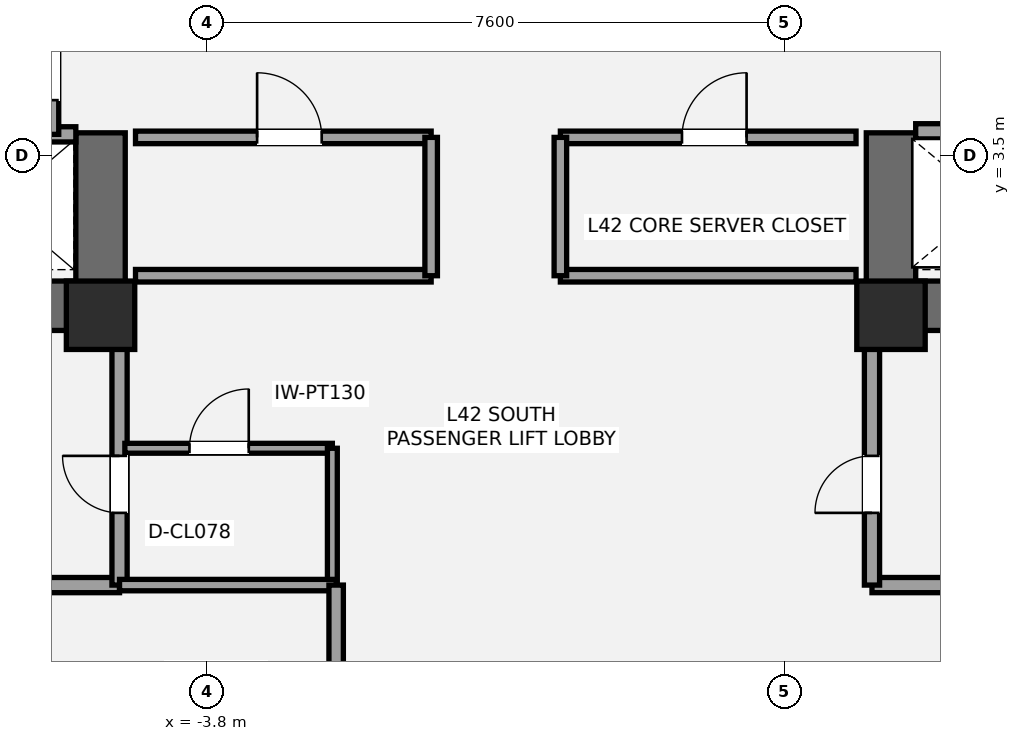
"""IFC4 building model, lengths in metres.
Left out: names, types, materials, properties, quantities, classifications, styles, units other than length and angle.
Written with IfcOpenShell. Run it as: python <this file> out.ifc"""

import sys

from ifc_helpers import new_model, si_unit, direction, frame, frame_2d, origin, origin_2d, place, context, subcontext, project, spatial, rectangle, extrude, element, fill, save


model = new_model("IFC4")
c1 = context("Model", 3, precision=1e-05, world=origin(), true_north=direction((0.0, 1.0)))
c2 = subcontext(c1, "Body", "Model", "MODEL_VIEW")
j1 = project(units=[si_unit("LENGTHUNIT", "METRE"), si_unit("PLANEANGLEUNIT", "RADIAN")], contexts=[c1])
p1 = place(None, origin())
s1 = spatial("IfcSite", under=j1, at=p1, CompositionType="ELEMENT")
p2 = place(p1, origin())
s2 = spatial("IfcBuilding", under=s1, at=p2, CompositionType="ELEMENT")
p3 = place(p2, frame((0.0, 0.0, 156.6)))
s3 = spatial("IfcBuildingStorey", under=s2, at=p3, CompositionType="ELEMENT", Elevation=156.6)
p4 = place(p3, frame((-4.875, 1.525, 0.0), z_axis=(0.0, 0.0, 1.0), x_axis=(-1.0, 0.0, 0.0)))
e1 = element("IfcWall", 1, at=p4, inside=s3, PredefinedType="SHEAR", context=c2, shape_type="SweptSolid", body=[
    extrude(rectangle(XDim=8.925, YDim=0.65, at=frame_2d((4.462, 0.0))), origin(), (0.0, 0.0, 1.0), 3.2),
])
p5 = place(p4, frame((5.425, 0.0, 0.0)))
e2 = element("IfcOpeningElement", 2, at=p5, cuts=e1, PredefinedType="OPENING", context=c2, shape_type="SweptSolid", body=[
    extrude(rectangle(XDim=1.05, YDim=2.15, at=frame_2d((0.525, 1.075))), frame((0.0, 0.335, 0.0), z_axis=(0.0, -1.0, 0.0), x_axis=(1.0, 0.0, 0.0)), (0.0, 0.0, 1.0), 0.67),
])
p6 = place(p4, frame((3.755, 0.0, 0.0)))
e3 = element("IfcOpeningElement", 3, at=p6, cuts=e1, PredefinedType="OPENING", context=c2, shape_type="SweptSolid", body=[
    extrude(rectangle(XDim=1.1, YDim=2.2, at=frame_2d((0.55, 1.1))), frame((0.0, 0.335, 0.0), z_axis=(0.0, -1.0, 0.0), x_axis=(1.0, 0.0, 0.0)), (0.0, 0.0, 1.0), 0.67),
])
p7 = place(p3, frame((-5.2, 1.2, 0.0), z_axis=(0.0, 0.0, 1.0), x_axis=(0.0, 1.0, 0.0)))
e4 = element("IfcWall", 4, at=p7, inside=s3, PredefinedType="SHEAR", context=c2, shape_type="SweptSolid", body=[
    extrude(rectangle(XDim=2.6, YDim=0.65, at=frame_2d((1.3, 0.0))), origin(), (0.0, 0.0, 1.0), 3.2),
])
p8 = place(p3, frame((13.8, 1.525, 0.0), z_axis=(0.0, 0.0, 1.0), x_axis=(-1.0, 0.0, 0.0)))
e5 = element("IfcWall", 5, at=p8, inside=s3, PredefinedType="SHEAR", context=c2, shape_type="SweptSolid", body=[
    extrude(rectangle(XDim=8.925, YDim=0.65, at=frame_2d((4.462, 0.0))), origin(), (0.0, 0.0, 1.0), 3.2),
])
p9 = place(p8, frame((2.45, 0.0, 0.0)))
e6 = element("IfcOpeningElement", 6, at=p9, cuts=e5, PredefinedType="OPENING", context=c2, shape_type="SweptSolid", body=[
    extrude(rectangle(XDim=1.05, YDim=2.15, at=frame_2d((0.525, 1.075))), frame((0.0, 0.335, 0.0), z_axis=(0.0, -1.0, 0.0), x_axis=(1.0, 0.0, 0.0)), (0.0, 0.0, 1.0), 0.67),
])
p10 = place(p8, frame((4.45, 0.0, 0.0)))
e7 = element("IfcOpeningElement", 7, at=p10, cuts=e5, PredefinedType="OPENING", context=c2, shape_type="SweptSolid", body=[
    extrude(rectangle(XDim=1.1, YDim=2.2, at=frame_2d((0.55, 1.1))), frame((0.0, 0.335, 0.0), z_axis=(0.0, -1.0, 0.0), x_axis=(1.0, 0.0, 0.0)), (0.0, 0.0, 1.0), 0.67),
])
p11 = place(p3, frame((5.2, 1.2, 0.0), z_axis=(0.0, 0.0, 1.0), x_axis=(0.0, 1.0, 0.0)))
e8 = element("IfcWall", 8, at=p11, inside=s3, PredefinedType="SHEAR", context=c2, shape_type="SweptSolid", body=[
    extrude(rectangle(XDim=2.6, YDim=0.65, at=frame_2d((1.3, 0.0))), origin(), (0.0, 0.0, 1.0), 3.2),
])
for number, where, z_axis, x_axis in (
    (9, (-5.2, 1.4, 0.0), (0.0, 0.0, 1.0), (1.0, 0.0, 0.0)),
    (10, (5.2, 1.4, 0.0), (0.0, 0.0, 1.0), (1.0, 0.0, 0.0)),
):
    element("IfcColumn", number, at=place(p3, frame(where, z_axis=z_axis, x_axis=x_axis)), inside=s3, PredefinedType="COLUMN", context=c2, shape_type="SweptSolid", body=[
        extrude(rectangle(XDim=0.9, YDim=0.9, at=origin_2d()), origin(), (0.0, 0.0, 1.0), 3.2),
    ])
p12 = place(p3, frame((-7.2, -2.15, 0.0), z_axis=(0.0, 0.0, 1.0), x_axis=(1.0, 0.0, 0.0)))
e11 = element("IfcWall", 11, at=p12, inside=s3, PredefinedType="SOLIDWALL", context=c2, shape_type="SweptSolid", body=[
    extrude(rectangle(XDim=2.25, YDim=0.2, at=frame_2d((1.125, 0.0))), origin(), (0.0, 0.0, 1.0), 3.02),
])
p13 = place(p3, frame((-4.95, -2.15, 0.0), z_axis=(0.0, 0.0, 1.0), x_axis=(0.0, 1.0, 0.0)))
e12 = element("IfcWall", 12, at=p13, inside=s3, PredefinedType="SOLIDWALL", context=c2, shape_type="SweptSolid", body=[
    extrude(rectangle(XDim=3.4, YDim=0.2, at=frame_2d((1.7, 0.0))), origin(), (0.0, 0.0, 1.0), 2.473),
])
p14 = place(p13, frame((0.95, 0.0, 0.0)))
e13 = element("IfcOpeningElement", 13, at=p14, cuts=e12, PredefinedType="OPENING", context=c2, shape_type="SweptSolid", body=[
    extrude(rectangle(XDim=0.75, YDim=2.1, at=frame_2d((0.375, 1.05))), frame((0.0, 0.11, 0.0), z_axis=(0.0, -1.0, 0.0), x_axis=(1.0, 0.0, 0.0)), (0.0, 0.0, 1.0), 0.22),
])
p15 = place(p3, frame((4.95, -2.15, 0.0), z_axis=(0.0, 0.0, 1.0), x_axis=(1.0, 0.0, 0.0)))
e14 = element("IfcWall", 14, at=p15, inside=s3, PredefinedType="SOLIDWALL", context=c2, shape_type="SweptSolid", body=[
    extrude(rectangle(XDim=2.25, YDim=0.2, at=frame_2d((1.125, 0.0))), origin(), (0.0, 0.0, 1.0), 3.02),
])
p16 = place(p3, frame((4.95, -2.15, 0.0), z_axis=(0.0, 0.0, 1.0), x_axis=(0.0, 1.0, 0.0)))
e15 = element("IfcWall", 15, at=p16, inside=s3, PredefinedType="SOLIDWALL", context=c2, shape_type="SweptSolid", body=[
    extrude(rectangle(XDim=3.4, YDim=0.2, at=frame_2d((1.7, 0.0))), origin(), (0.0, 0.0, 1.0), 2.473),
])
p17 = place(p16, frame((0.95, 0.0, 0.0)))
e16 = element("IfcOpeningElement", 16, at=p17, cuts=e15, PredefinedType="OPENING", context=c2, shape_type="SweptSolid", body=[
    extrude(rectangle(XDim=0.75, YDim=2.1, at=frame_2d((0.375, 1.05))), frame((0.0, 0.11, 0.0), z_axis=(0.0, -1.0, 0.0), x_axis=(1.0, 0.0, 0.0)), (0.0, 0.0, 1.0), 0.22),
])
p18 = place(p3, frame((-4.88, -0.35, 0.0), z_axis=(0.0, 0.0, 1.0), x_axis=(1.0, 0.0, 0.0)))
e17 = element("IfcWall", 17, at=p18, inside=s3, PredefinedType="PARTITIONING", context=c2, shape_type="SweptSolid", body=[
    extrude(rectangle(XDim=2.73, YDim=0.13, at=frame_2d((1.365, 0.0))), origin(), (0.0, 0.0, 1.0), 2.473),
])
p19 = place(p18, frame((0.85, 0.0, 0.0)))
e18 = element("IfcOpeningElement", 18, at=p19, cuts=e17, PredefinedType="OPENING", context=c2, shape_type="SweptSolid", body=[
    extrude(rectangle(XDim=0.78, YDim=2.1, at=frame_2d((0.39, 1.05))), frame((0.0, 0.075, 0.0), z_axis=(0.0, -1.0, 0.0), x_axis=(1.0, 0.0, 0.0)), (0.0, 0.0, 1.0), 0.15),
])
p20 = place(p3, frame((-2.15, -2.15, 0.0), z_axis=(0.0, 0.0, 1.0), x_axis=(0.0, 1.0, 0.0)))
e19 = element("IfcWall", 19, at=p20, inside=s3, PredefinedType="PARTITIONING", context=c2, shape_type="SweptSolid", body=[
    extrude(rectangle(XDim=1.8, YDim=0.13, at=frame_2d((0.9, 0.0))), origin(), (0.0, 0.0, 1.0), 3.02),
])
p21 = place(p3, frame((-9.78, 3.78, 0.0), z_axis=(0.0, 0.0, 1.0), x_axis=(1.0, 0.0, 0.0)))
e20 = element("IfcWall", 20, at=p21, inside=s3, PredefinedType="SOLIDWALL", context=c2, shape_type="SweptSolid", body=[
    extrude(rectangle(XDim=4.255, YDim=0.2, at=frame_2d((2.127, 0.0))), origin(), (0.0, 0.0, 1.0), 3.02),
])
p22 = place(p3, frame((-5.85, 3.78, 0.0), z_axis=(0.0, 0.0, 1.0), x_axis=(0.0, 1.0, 0.0)))
e21 = element("IfcWall", 21, at=p22, inside=s3, PredefinedType="SOLIDWALL", context=c2, shape_type="SweptSolid", body=[
    extrude(rectangle(XDim=1.69, YDim=0.2, at=frame_2d((0.845, 0.0))), origin(), (0.0, 0.0, 1.0), 3.02),
])
p23 = place(p22, frame((0.45, 0.0, 0.0)))
e22 = element("IfcOpeningElement", 22, at=p23, cuts=e21, PredefinedType="OPENING", context=c2, shape_type="SweptSolid", body=[
    extrude(rectangle(XDim=0.75, YDim=2.1, at=frame_2d((0.375, 1.05))), frame((0.0, 0.11, 0.0), z_axis=(0.0, -1.0, 0.0), x_axis=(1.0, 0.0, 0.0)), (0.0, 0.0, 1.0), 0.22),
])
p24 = place(p3, frame((5.525, 3.82, 0.0), z_axis=(0.0, 0.0, 1.0), x_axis=(1.0, 0.0, 0.0)))
e23 = element("IfcWall", 23, at=p24, inside=s3, PredefinedType="SOLIDWALL", context=c2, shape_type="SweptSolid", body=[
    extrude(rectangle(XDim=4.255, YDim=0.2, at=frame_2d((2.127, 0.0))), origin(), (0.0, 0.0, 1.0), 3.02),
])
p25 = place(p24, frame((0.65, 0.0, 0.0)))
e24 = element("IfcOpeningElement", 24, at=p25, cuts=e23, PredefinedType="OPENING", context=c2, shape_type="SweptSolid", body=[
    extrude(rectangle(XDim=1.2, YDim=2.2, at=frame_2d((0.6, 1.1))), frame((0.0, 0.11, 0.0), z_axis=(0.0, -1.0, 0.0), x_axis=(1.0, 0.0, 0.0)), (0.0, 0.0, 1.0), 0.22),
])
p26 = place(p3, frame((-4.74, 1.92, 0.0), z_axis=(0.0, 0.0, 1.0), x_axis=(1.0, 0.0, 0.0)))
e25 = element("IfcWall", 25, at=p26, inside=s3, PredefinedType="PARTITIONING", context=c2, shape_type="SweptSolid", body=[
    extrude(rectangle(XDim=3.89, YDim=0.165, at=frame_2d((1.945, 0.0))), origin(), (0.0, 0.0, 1.0), 2.16),
])
p27 = place(p3, frame((-4.74, 3.74, 0.0), z_axis=(0.0, 0.0, 1.0), x_axis=(1.0, 0.0, 0.0)))
e26 = element("IfcWall", 26, at=p27, inside=s3, PredefinedType="PARTITIONING", context=c2, shape_type="SweptSolid", body=[
    extrude(rectangle(XDim=3.89, YDim=0.165, at=frame_2d((1.945, 0.0))), origin(), (0.0, 0.0, 1.0), 3.02),
])
p28 = place(p27, frame((1.6, 0.0, 0.0)))
e27 = element("IfcOpeningElement", 27, at=p28, cuts=e26, PredefinedType="OPENING", context=c2, shape_type="SweptSolid", body=[
    extrude(rectangle(XDim=0.85, YDim=2.1, at=frame_2d((0.425, 1.05))), frame((0.0, 0.093, 0.0), z_axis=(0.0, -1.0, 0.0), x_axis=(1.0, 0.0, 0.0)), (0.0, 0.0, 1.0), 0.185),
])
p29 = place(p3, frame((-0.85, 1.92, 0.0), z_axis=(0.0, 0.0, 1.0), x_axis=(0.0, 1.0, 0.0)))
e28 = element("IfcWall", 28, at=p29, inside=s3, PredefinedType="PARTITIONING", context=c2, shape_type="SweptSolid", body=[
    extrude(rectangle(XDim=1.82, YDim=0.165, at=frame_2d((0.91, 0.0))), origin(), (0.0, 0.0, 1.0), 3.02),
])
p30 = place(p3, frame((0.85, 1.92, 0.0), z_axis=(0.0, 0.0, 1.0), x_axis=(1.0, 0.0, 0.0)))
e29 = element("IfcWall", 29, at=p30, inside=s3, PredefinedType="PARTITIONING", context=c2, shape_type="SweptSolid", body=[
    extrude(rectangle(XDim=3.89, YDim=0.165, at=frame_2d((1.945, 0.0))), origin(), (0.0, 0.0, 1.0), 2.16),
])
p31 = place(p3, frame((0.85, 3.74, 0.0), z_axis=(0.0, 0.0, 1.0), x_axis=(1.0, 0.0, 0.0)))
e30 = element("IfcWall", 30, at=p31, inside=s3, PredefinedType="PARTITIONING", context=c2, shape_type="SweptSolid", body=[
    extrude(rectangle(XDim=3.89, YDim=0.165, at=frame_2d((1.945, 0.0))), origin(), (0.0, 0.0, 1.0), 3.02),
])
p32 = place(p31, frame((1.6, 0.0, 0.0)))
e31 = element("IfcOpeningElement", 31, at=p32, cuts=e30, PredefinedType="OPENING", context=c2, shape_type="SweptSolid", body=[
    extrude(rectangle(XDim=0.85, YDim=2.1, at=frame_2d((0.425, 1.05))), frame((0.0, 0.093, 0.0), z_axis=(0.0, -1.0, 0.0), x_axis=(1.0, 0.0, 0.0)), (0.0, 0.0, 1.0), 0.185),
])
p33 = place(p3, frame((0.85, 1.92, 0.0), z_axis=(0.0, 0.0, 1.0), x_axis=(0.0, 1.0, 0.0)))
e32 = element("IfcWall", 32, at=p33, inside=s3, PredefinedType="PARTITIONING", context=c2, shape_type="SweptSolid", body=[
    extrude(rectangle(XDim=1.82, YDim=0.165, at=frame_2d((0.91, 0.0))), origin(), (0.0, 0.0, 1.0), 3.02),
])
p34 = place(p3, frame((-4.95, -2.15, 0.0), z_axis=(0.0, 0.0, 1.0), x_axis=(1.0, 0.0, 0.0)))
e33 = element("IfcWall", 33, at=p34, inside=s3, PredefinedType="PLUMBINGWALL", context=c2, shape_type="SweptSolid", body=[
    extrude(rectangle(XDim=2.85, YDim=0.15, at=frame_2d((1.425, 0.0))), origin(), (0.0, 0.0, 1.0), 2.473),
])
p35 = place(p3, frame((-2.1, -4.05, 0.0), z_axis=(0.0, 0.0, 1.0), x_axis=(0.0, 1.0, 0.0)))
e34 = element("IfcWall", 34, at=p35, inside=s3, PredefinedType="PLUMBINGWALL", context=c2, shape_type="SweptSolid", body=[
    extrude(rectangle(XDim=1.9, YDim=0.19, at=frame_2d((0.95, 0.0))), origin(), (0.0, 0.0, 1.0), 2.473),
])
p36 = place(p14, origin())
e35 = element("IfcDoor", 35, at=p36, inside=s3, OperationType="SINGLE_SWING_RIGHT", PredefinedType="DOOR", context=c2, shape_type="SweptSolid", body=[
    extrude(rectangle(XDim=0.75, YDim=2.1, at=frame_2d((0.375, 1.05))), frame((0.0, 0.025, 0.0), z_axis=(0.0, -1.0, 0.0), x_axis=(1.0, 0.0, 0.0)), (0.0, 0.0, 1.0), 0.05),
])
fill(e13, e35)
p37 = place(p17, origin())
e36 = element("IfcDoor", 36, at=p37, inside=s3, OperationType="SINGLE_SWING_LEFT", PredefinedType="DOOR", context=c2, shape_type="SweptSolid", body=[
    extrude(rectangle(XDim=0.75, YDim=2.1, at=frame_2d((0.375, 1.05))), frame((0.0, 0.025, 0.0), z_axis=(0.0, -1.0, 0.0), x_axis=(1.0, 0.0, 0.0)), (0.0, 0.0, 1.0), 0.05),
])
fill(e16, e36)
p38 = place(p19, origin())
e37 = element("IfcDoor", 37, at=p38, inside=s3, OperationType="SINGLE_SWING_RIGHT", PredefinedType="DOOR", context=c2, shape_type="SweptSolid", body=[
    extrude(rectangle(XDim=0.78, YDim=2.1, at=frame_2d((0.39, 1.05))), frame((0.0, 0.025, 0.0), z_axis=(0.0, -1.0, 0.0), x_axis=(1.0, 0.0, 0.0)), (0.0, 0.0, 1.0), 0.05),
])
fill(e18, e37)
p39 = place(p23, origin())
e38 = element("IfcDoor", 38, at=p39, inside=s3, OperationType="SINGLE_SWING_RIGHT", PredefinedType="DOOR", context=c2, shape_type="SweptSolid", body=[
    extrude(rectangle(XDim=0.75, YDim=2.1, at=frame_2d((0.375, 1.05))), frame((0.0, 0.025, 0.0), z_axis=(0.0, -1.0, 0.0), x_axis=(1.0, 0.0, 0.0)), (0.0, 0.0, 1.0), 0.05),
])
fill(e22, e38)
p40 = place(p28, origin())
e39 = element("IfcDoor", 39, at=p40, inside=s3, OperationType="SINGLE_SWING_LEFT", PredefinedType="DOOR", context=c2, shape_type="SweptSolid", body=[
    extrude(rectangle(XDim=0.85, YDim=2.1, at=frame_2d((0.425, 1.05))), frame((0.0, 0.025, 0.0), z_axis=(0.0, -1.0, 0.0), x_axis=(1.0, 0.0, 0.0)), (0.0, 0.0, 1.0), 0.05),
])
fill(e27, e39)
p41 = place(p32, origin())
e40 = element("IfcDoor", 40, at=p41, inside=s3, OperationType="SINGLE_SWING_RIGHT", PredefinedType="DOOR", context=c2, shape_type="SweptSolid", body=[
    extrude(rectangle(XDim=0.85, YDim=2.1, at=frame_2d((0.425, 1.05))), frame((0.0, 0.025, 0.0), z_axis=(0.0, -1.0, 0.0), x_axis=(1.0, 0.0, 0.0)), (0.0, 0.0, 1.0), 0.05),
])
fill(e31, e40)
save(model, sys.argv[1])
